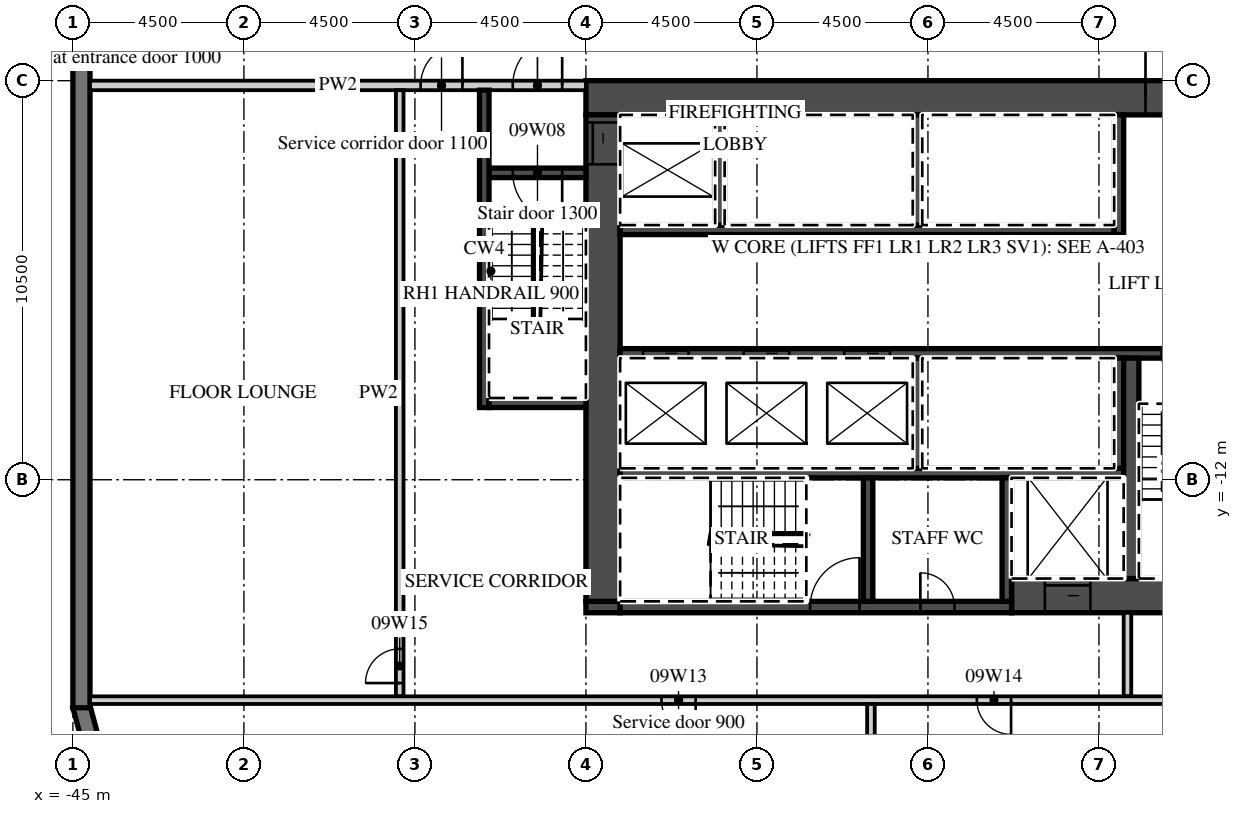
"""IFC4 building model, lengths in metres.
Left out: names, types, materials, properties, quantities, classifications, styles, units other than length and angle.
Written with IfcOpenShell. Run it as: python <this file> out.ifc"""

import sys

from ifc_helpers import new_model, si_unit, direction, frame, frame_2d, origin, place, context, subcontext, project, spatial, polyline, rectangle, outline, extrude, element, fill, save


model = new_model("IFC4")
c1 = context("Model", 3, precision=1e-05, world=origin(), true_north=direction((0.0, 1.0)))
c2 = subcontext(c1, "Body", "Model", "MODEL_VIEW")
j1 = project(units=[si_unit("LENGTHUNIT", "METRE"), si_unit("PLANEANGLEUNIT", "RADIAN")], contexts=[c1])
p1 = place(None, origin())
s1 = spatial("IfcSite", under=j1, at=p1, CompositionType="ELEMENT")
p2 = place(p1, origin())
s2 = spatial("IfcBuilding", under=s1, at=p2, CompositionType="ELEMENT")
p3 = place(p2, frame((0.0, 0.0, 60.0)))
s3 = spatial("IfcBuildingStorey", under=s2, at=p3, CompositionType="ELEMENT", Elevation=60.0)
p4 = place(p3, frame((-44.783, -17.942, 0.0), z_axis=(0.0, 0.0, 1.0), x_axis=(0.25881466832, -0.965926999034, 0.0)))
e1 = element("IfcWall", 1, at=p4, inside=s3, PredefinedType="SOLIDWALL", context=c2, shape_type="SweptSolid", body=[
    extrude(outline(polyline([(0.0, -0.225), (2.071, -0.225), (1.95, 0.225), (0.121, 0.225), (0.0, -0.225)])), origin(), (0.0, 0.0, 1.0), 3.02),
])
p5 = place(p3, frame((-44.775, 18.0, 0.0), z_axis=(0.0, 0.0, 1.0), x_axis=(0.0, -1.0, 0.0)))
e2 = element("IfcWall", 2, at=p5, inside=s3, PredefinedType="SOLIDWALL", context=c2, shape_type="SweptSolid", body=[
    extrude(rectangle(XDim=36.0, YDim=0.45, at=frame_2d((18.0, 0.0))), origin(), (0.0, 0.0, 1.0), 3.02),
])
p6 = place(p5, frame((3.9, 0.0, 0.45)))
e3 = element("IfcOpeningElement", 3, at=p6, cuts=e2, PredefinedType="OPENING", context=c2, shape_type="SweptSolid", body=[
    extrude(rectangle(XDim=3.3, YDim=2.25, at=frame_2d((1.65, 1.125))), frame((0.0, 0.235, 0.0), z_axis=(0.0, -1.0, 0.0), x_axis=(1.0, 0.0, 0.0)), (0.0, 0.0, 1.0), 0.47),
])
p7 = place(p5, frame((8.4, 0.0, 0.45)))
e4 = element("IfcOpeningElement", 4, at=p7, cuts=e2, PredefinedType="OPENING", context=c2, shape_type="SweptSolid", body=[
    extrude(rectangle(XDim=3.3, YDim=2.25, at=frame_2d((1.65, 1.125))), frame((0.0, 0.235, 0.0), z_axis=(0.0, -1.0, 0.0), x_axis=(1.0, 0.0, 0.0)), (0.0, 0.0, 1.0), 0.47),
])
p8 = place(p5, frame((12.9, 0.0, 0.45)))
e5 = element("IfcOpeningElement", 5, at=p8, cuts=e2, PredefinedType="OPENING", context=c2, shape_type="SweptSolid", body=[
    extrude(rectangle(XDim=3.3, YDim=2.25, at=frame_2d((1.65, 1.125))), frame((0.0, 0.235, 0.0), z_axis=(0.0, -1.0, 0.0), x_axis=(1.0, 0.0, 0.0)), (0.0, 0.0, 1.0), 0.47),
])
p9 = place(p3, frame((-31.5, -1.95, 0.0), z_axis=(0.0, 0.0, 1.0), x_axis=(1.0, 0.0, 0.0)))
e6 = element("IfcWall", 6, at=p9, inside=s3, PredefinedType="SHEAR", context=c2, shape_type="SweptSolid", body=[
    extrude(rectangle(XDim=18.0, YDim=0.9, at=frame_2d((9.0, 0.0))), origin(), (0.0, 0.0, 1.0), 3.02),
])
p10 = place(p9, frame((14.725, 0.0, 0.0)))
e7 = element("IfcOpeningElement", 7, at=p10, cuts=e6, PredefinedType="OPENING", context=c2, shape_type="SweptSolid", body=[
    extrude(rectangle(XDim=1.8, YDim=2.1, at=frame_2d((0.9, 1.05))), frame((0.0, 0.46, 0.0), z_axis=(0.0, -1.0, 0.0), x_axis=(1.0, 0.0, 0.0)), (0.0, 0.0, 1.0), 0.92),
])
p11 = place(p3, frame((-20.3, -15.05, 0.0), z_axis=(0.0, 0.0, 1.0), x_axis=(1.0, 0.0, 0.0)))
e8 = element("IfcWall", 8, at=p11, inside=s3, PredefinedType="SHEAR", context=c2, shape_type="SweptSolid", body=[
    extrude(rectangle(XDim=6.8, YDim=0.9, at=frame_2d((3.4, 0.0))), origin(), (0.0, 0.0, 1.0), 3.02),
])
p12 = place(p11, frame((0.875, 0.0, 0.0)))
e9 = element("IfcOpeningElement", 9, at=p12, cuts=e8, PredefinedType="OPENING", context=c2, shape_type="SweptSolid", body=[
    extrude(rectangle(XDim=1.2, YDim=2.1, at=frame_2d((0.6, 1.05))), frame((0.0, 0.46, 0.0), z_axis=(0.0, -1.0, 0.0), x_axis=(1.0, 0.0, 0.0)), (0.0, 0.0, 1.0), 0.92),
])
p13 = place(p3, frame((-31.5, -15.35, 0.0), z_axis=(0.0, 0.0, 1.0), x_axis=(1.0, 0.0, 0.0)))
e10 = element("IfcWall", 10, at=p13, inside=s3, PredefinedType="SHEAR", context=c2, shape_type="SweptSolid", body=[
    extrude(rectangle(XDim=0.9, YDim=0.3, at=frame_2d((0.45, 0.0))), origin(), (0.0, 0.0, 1.0), 3.02),
])
p14 = place(p3, frame((-30.6, -15.35, 0.0), z_axis=(0.0, 0.0, 1.0), x_axis=(1.0, 0.0, 0.0)))
e11 = element("IfcWall", 11, at=p14, inside=s3, PredefinedType="SHEAR", context=c2, shape_type="SweptSolid", body=[
    extrude(rectangle(XDim=10.3, YDim=0.3, at=frame_2d((5.15, 0.0))), origin(), (0.0, 0.0, 1.0), 3.02),
])
p15 = place(p14, frame((5.0, 0.0, 0.0)))
e12 = element("IfcOpeningElement", 12, at=p15, cuts=e11, PredefinedType="OPENING", context=c2, shape_type="SweptSolid", body=[
    extrude(rectangle(XDim=1.3, YDim=2.1, at=frame_2d((0.65, 1.05))), frame((0.0, 0.16, 0.0), z_axis=(0.0, -1.0, 0.0), x_axis=(1.0, 0.0, 0.0)), (0.0, 0.0, 1.0), 0.32),
])
p16 = place(p14, frame((7.9, 0.0, 0.0)))
e13 = element("IfcOpeningElement", 13, at=p16, cuts=e11, PredefinedType="OPENING", context=c2, shape_type="SweptSolid", body=[
    extrude(rectangle(XDim=0.9, YDim=2.1, at=frame_2d((0.45, 1.05))), frame((0.0, 0.16, 0.0), z_axis=(0.0, -1.0, 0.0), x_axis=(1.0, 0.0, 0.0)), (0.0, 0.0, 1.0), 0.32),
])
p17 = place(p3, frame((-31.05, -15.2, 0.0), z_axis=(0.0, 0.0, 1.0), x_axis=(0.0, 1.0, 0.0)))
e14 = element("IfcWall", 14, at=p17, inside=s3, PredefinedType="SHEAR", context=c2, shape_type="SweptSolid", body=[
    extrude(rectangle(XDim=12.8, YDim=0.9, at=frame_2d((6.4, 0.0))), origin(), (0.0, 0.0, 1.0), 3.02),
])
p18 = place(p17, frame((11.5, 0.0, 0.0)))
e15 = element("IfcOpeningElement", 15, at=p18, cuts=e14, PredefinedType="OPENING", context=c2, shape_type="SweptSolid", body=[
    extrude(rectangle(XDim=1.1, YDim=2.1, at=frame_2d((0.55, 1.05))), frame((0.0, 0.46, 0.0), z_axis=(0.0, -1.0, 0.0), x_axis=(1.0, 0.0, 0.0)), (0.0, 0.0, 1.0), 0.92),
])
p19 = place(p3, frame((-30.6, -5.425, 0.0), z_axis=(0.0, 0.0, 1.0), x_axis=(1.0, 0.0, 0.0)))
e16 = element("IfcWall", 16, at=p19, inside=s3, PredefinedType="SHEAR", context=c2, shape_type="SweptSolid", body=[
    extrude(rectangle(XDim=13.0, YDim=0.25, at=frame_2d((6.5, 0.0))), origin(), (0.0, 0.0, 1.0), 3.02),
])
p20 = place(p3, frame((-17.475, -5.55, 0.0), z_axis=(0.0, 0.0, 1.0), x_axis=(0.0, 1.0, 0.0)))
e17 = element("IfcWall", 17, at=p20, inside=s3, PredefinedType="SHEAR", context=c2, shape_type="SweptSolid", body=[
    extrude(rectangle(XDim=3.15, YDim=0.25, at=frame_2d((1.575, 0.0))), origin(), (0.0, 0.0, 1.0), 3.02),
])
for number, where, z_axis, x_axis in (
    (18, (-27.975, -5.3, 0.0), (0.0, 0.0, 1.0), (0.0, 1.0, 0.0)),
    (19, (-22.775, -5.3, 0.0), (0.0, 0.0, 1.0), (0.0, 1.0, 0.0)),
):
    element("IfcWall", number, at=place(p3, frame(where, z_axis=z_axis, x_axis=x_axis)), inside=s3, PredefinedType="SHEAR", context=c2, shape_type="SweptSolid", body=[
        extrude(rectangle(XDim=2.9, YDim=0.25, at=frame_2d((1.45, 0.0))), origin(), (0.0, 0.0, 1.0), 3.02),
    ])
p21 = place(p3, frame((-30.6, -8.675, 0.0), z_axis=(0.0, 0.0, 1.0), x_axis=(1.0, 0.0, 0.0)))
e20 = element("IfcWall", 20, at=p21, inside=s3, PredefinedType="SHEAR", context=c2, shape_type="SweptSolid", body=[
    extrude(rectangle(XDim=16.2, YDim=0.25, at=frame_2d((8.1, 0.0))), origin(), (0.0, 0.0, 1.0), 3.02),
])
p22 = place(p21, frame((0.6, 0.0, 0.0)))
e21 = element("IfcOpeningElement", 21, at=p22, cuts=e20, PredefinedType="OPENING", context=c2, shape_type="SweptSolid", body=[
    extrude(rectangle(XDim=1.2, YDim=2.1, at=frame_2d((0.6, 1.05))), frame((0.0, 0.135, 0.0), z_axis=(0.0, -1.0, 0.0), x_axis=(1.0, 0.0, 0.0)), (0.0, 0.0, 1.0), 0.27),
])
p23 = place(p21, frame((3.25, 0.0, 0.0)))
e22 = element("IfcOpeningElement", 22, at=p23, cuts=e20, PredefinedType="OPENING", context=c2, shape_type="SweptSolid", body=[
    extrude(rectangle(XDim=1.2, YDim=2.1, at=frame_2d((0.6, 1.05))), frame((0.0, 0.135, 0.0), z_axis=(0.0, -1.0, 0.0), x_axis=(1.0, 0.0, 0.0)), (0.0, 0.0, 1.0), 0.27),
])
p24 = place(p21, frame((5.9, 0.0, 0.0)))
e23 = element("IfcOpeningElement", 23, at=p24, cuts=e20, PredefinedType="OPENING", context=c2, shape_type="SweptSolid", body=[
    extrude(rectangle(XDim=1.2, YDim=2.1, at=frame_2d((0.6, 1.05))), frame((0.0, 0.135, 0.0), z_axis=(0.0, -1.0, 0.0), x_axis=(1.0, 0.0, 0.0)), (0.0, 0.0, 1.0), 0.27),
])
p25 = place(p21, frame((14.25, 0.0, 0.0)))
e24 = element("IfcOpeningElement", 24, at=p25, cuts=e20, PredefinedType="OPENING", context=c2, shape_type="SweptSolid", body=[
    extrude(rectangle(XDim=1.3, YDim=2.1, at=frame_2d((0.65, 1.05))), frame((0.0, 0.135, 0.0), z_axis=(0.0, -1.0, 0.0), x_axis=(1.0, 0.0, 0.0)), (0.0, 0.0, 1.0), 0.27),
])
p26 = place(p3, frame((-30.6, -11.825, 0.0), z_axis=(0.0, 0.0, 1.0), x_axis=(1.0, 0.0, 0.0)))
e25 = element("IfcWall", 25, at=p26, inside=s3, PredefinedType="SHEAR", context=c2, shape_type="SweptSolid", body=[
    extrude(rectangle(XDim=13.25, YDim=0.25, at=frame_2d((6.625, 0.0))), origin(), (0.0, 0.0, 1.0), 3.02),
])
for number, where, z_axis, x_axis in (
    (26, (-17.475, -11.7, 0.0), (0.0, 0.0, 1.0), (0.0, 1.0, 0.0)),
    (27, (-22.775, -11.7, 0.0), (0.0, 0.0, 1.0), (0.0, 1.0, 0.0)),
):
    element("IfcWall", number, at=place(p3, frame(where, z_axis=z_axis, x_axis=x_axis)), inside=s3, PredefinedType="SHEAR", context=c2, shape_type="SweptSolid", body=[
        extrude(rectangle(XDim=2.9, YDim=0.25, at=frame_2d((1.45, 0.0))), origin(), (0.0, 0.0, 1.0), 3.02),
    ])
p27 = place(p3, frame((-17.15, -14.6, 0.0), z_axis=(0.0, 0.0, 1.0), x_axis=(0.0, 1.0, 0.0)))
e28 = element("IfcWall", 28, at=p27, inside=s3, PredefinedType="SHEAR", context=c2, shape_type="SweptSolid", body=[
    extrude(rectangle(XDim=5.8, YDim=0.4, at=frame_2d((2.9, 0.0))), origin(), (0.0, 0.0, 1.0), 3.02),
])
for number, where, z_axis, x_axis in (
    (29, (-20.425, -15.2, 0.0), (0.0, 0.0, 1.0), (0.0, 1.0, 0.0)),
    (30, (-24.075, -15.2, 0.0), (0.0, 0.0, 1.0), (0.0, 1.0, 0.0)),
):
    element("IfcWall", number, at=place(p3, frame(where, z_axis=z_axis, x_axis=x_axis)), inside=s3, PredefinedType="SHEAR", context=c2, shape_type="SweptSolid", body=[
        extrude(rectangle(XDim=3.25, YDim=0.25, at=frame_2d((1.625, 0.0))), origin(), (0.0, 0.0, 1.0), 3.02),
    ])
p28 = place(p3, frame((-44.55, -1.625, 0.0), z_axis=(0.0, 0.0, 1.0), x_axis=(1.0, 0.0, 0.0)))
e31 = element("IfcWall", 31, at=p28, inside=s3, PredefinedType="PARTITIONING", context=c2, shape_type="SweptSolid", body=[
    extrude(rectangle(XDim=13.05, YDim=0.25, at=frame_2d((6.525, 0.0))), origin(), (0.0, 0.0, 1.0), 3.02),
])
p29 = place(p28, frame((11.125, 0.0, 0.0)))
e32 = element("IfcOpeningElement", 32, at=p29, cuts=e31, PredefinedType="OPENING", context=c2, shape_type="SweptSolid", body=[
    extrude(rectangle(XDim=1.3, YDim=2.1, at=frame_2d((0.65, 1.05))), frame((0.0, 0.135, 0.0), z_axis=(0.0, -1.0, 0.0), x_axis=(1.0, 0.0, 0.0)), (0.0, 0.0, 1.0), 0.27),
])
p30 = place(p28, frame((8.7, 0.0, 0.0)))
e33 = element("IfcOpeningElement", 33, at=p30, cuts=e31, PredefinedType="OPENING", context=c2, shape_type="SweptSolid", body=[
    extrude(rectangle(XDim=1.1, YDim=2.1, at=frame_2d((0.55, 1.05))), frame((0.0, 0.135, 0.0), z_axis=(0.0, -1.0, 0.0), x_axis=(1.0, 0.0, 0.0)), (0.0, 0.0, 1.0), 0.27),
])
p31 = place(p3, frame((-34.05, -3.925, 0.0), z_axis=(0.0, 0.0, 1.0), x_axis=(1.0, 0.0, 0.0)))
e34 = element("IfcWall", 34, at=p31, inside=s3, PredefinedType="SHEAR", context=c2, shape_type="SweptSolid", body=[
    extrude(rectangle(XDim=2.55, YDim=0.25, at=frame_2d((1.275, 0.0))), origin(), (0.0, 0.0, 1.0), 3.02),
])
p32 = place(p31, frame((0.625, 0.0, 0.0)))
e35 = element("IfcOpeningElement", 35, at=p32, cuts=e34, PredefinedType="OPENING", context=c2, shape_type="SweptSolid", body=[
    extrude(rectangle(XDim=1.3, YDim=2.1, at=frame_2d((0.65, 1.05))), frame((0.0, 0.135, 0.0), z_axis=(0.0, -1.0, 0.0), x_axis=(1.0, 0.0, 0.0)), (0.0, 0.0, 1.0), 0.27),
])
p33 = place(p3, frame((-34.175, -10.1, 0.0), z_axis=(0.0, 0.0, 1.0), x_axis=(0.0, 1.0, 0.0)))
e36 = element("IfcWall", 36, at=p33, inside=s3, PredefinedType="SHEAR", context=c2, shape_type="SweptSolid", body=[
    extrude(rectangle(XDim=8.35, YDim=0.25, at=frame_2d((4.175, 0.0))), origin(), (0.0, 0.0, 1.0), 3.02),
])
p34 = place(p3, frame((-34.05, -9.975, 0.0), z_axis=(0.0, 0.0, 1.0), x_axis=(1.0, 0.0, 0.0)))
e37 = element("IfcWall", 37, at=p34, inside=s3, PredefinedType="SHEAR", context=c2, shape_type="SweptSolid", body=[
    extrude(rectangle(XDim=2.55, YDim=0.25, at=frame_2d((1.275, 0.0))), origin(), (0.0, 0.0, 1.0), 3.02),
])
p35 = place(p3, frame((-17.25, -17.7, 0.0), z_axis=(0.0, 0.0, 1.0), x_axis=(0.0, 1.0, 0.0)))
e38 = element("IfcWall", 38, at=p35, inside=s3, PredefinedType="PARTITIONING", context=c2, shape_type="SweptSolid", body=[
    extrude(rectangle(XDim=2.2, YDim=0.2, at=frame_2d((1.1, 0.0))), origin(), (0.0, 0.0, 1.0), 3.02),
])
p36 = place(p3, frame((-36.4, -17.7, 0.0), z_axis=(0.0, 0.0, 1.0), x_axis=(0.0, 1.0, 0.0)))
e39 = element("IfcWall", 39, at=p36, inside=s3, PredefinedType="PARTITIONING", context=c2, shape_type="SweptSolid", body=[
    extrude(rectangle(XDim=15.95, YDim=0.2, at=frame_2d((7.975, 0.0))), origin(), (0.0, 0.0, 1.0), 3.02),
])
p37 = place(p36, frame((0.35, 0.0, 0.0)))
e40 = element("IfcOpeningElement", 40, at=p37, cuts=e39, PredefinedType="OPENING", context=c2, shape_type="SweptSolid", body=[
    extrude(rectangle(XDim=0.9, YDim=2.1, at=frame_2d((0.45, 1.05))), frame((0.0, 0.11, 0.0), z_axis=(0.0, -1.0, 0.0), x_axis=(1.0, 0.0, 0.0)), (0.0, 0.0, 1.0), 0.22),
])
p38 = place(p3, frame((-44.55, -17.8, 0.0), z_axis=(0.0, 0.0, 1.0), x_axis=(1.0, 0.0, 0.0)))
e41 = element("IfcWall", 41, at=p38, inside=s3, PredefinedType="PARTITIONING", context=c2, shape_type="SweptSolid", body=[
    extrude(rectangle(XDim=30.95, YDim=0.2, at=frame_2d((15.475, 0.0))), origin(), (0.0, 0.0, 1.0), 3.02),
])
p39 = place(p38, frame((15.038, 0.0, 0.0)))
e42 = element("IfcOpeningElement", 42, at=p39, cuts=e41, PredefinedType="OPENING", context=c2, shape_type="SweptSolid", body=[
    extrude(rectangle(XDim=0.9, YDim=2.1, at=frame_2d((0.45, 1.05))), frame((0.0, 0.11, 0.0), z_axis=(0.0, -1.0, 0.0), x_axis=(1.0, 0.0, 0.0)), (0.0, 0.0, 1.0), 0.22),
])
p40 = place(p38, frame((23.337, 0.0, 0.0)))
e43 = element("IfcOpeningElement", 43, at=p40, cuts=e41, PredefinedType="OPENING", context=c2, shape_type="SweptSolid", body=[
    extrude(rectangle(XDim=0.9, YDim=2.1, at=frame_2d((0.45, 1.05))), frame((0.0, 0.11, 0.0), z_axis=(0.0, -1.0, 0.0), x_axis=(1.0, 0.0, 0.0)), (0.0, 0.0, 1.0), 0.22),
])
p41 = place(p3, frame((-24.0, -21.55, 0.0), z_axis=(0.0, 0.0, 1.0), x_axis=(0.0, 1.0, 0.0)))
e44 = element("IfcWall", 44, at=p41, inside=s3, PredefinedType="PARTITIONING", context=c2, shape_type="SweptSolid", body=[
    extrude(rectangle(XDim=3.65, YDim=0.2, at=frame_2d((1.825, 0.0))), origin(), (0.0, 0.0, 1.0), 3.02),
])
p42 = place(p22, origin())
e45 = element("IfcDoor", 45, at=p42, inside=s3, OperationType="SLIDING_TO_LEFT", PredefinedType="DOOR", context=c2, shape_type="SweptSolid", body=[
    extrude(rectangle(XDim=1.2, YDim=2.1, at=frame_2d((0.6, 1.05))), frame((0.0, 0.025, 0.0), z_axis=(0.0, -1.0, 0.0), x_axis=(1.0, 0.0, 0.0)), (0.0, 0.0, 1.0), 0.05),
])
fill(e21, e45)
p43 = place(p23, origin())
e46 = element("IfcDoor", 46, at=p43, inside=s3, OperationType="SLIDING_TO_RIGHT", PredefinedType="DOOR", context=c2, shape_type="SweptSolid", body=[
    extrude(rectangle(XDim=1.2, YDim=2.1, at=frame_2d((0.6, 1.05))), frame((0.0, 0.025, 0.0), z_axis=(0.0, -1.0, 0.0), x_axis=(1.0, 0.0, 0.0)), (0.0, 0.0, 1.0), 0.05),
])
fill(e22, e46)
p44 = place(p24, origin())
e47 = element("IfcDoor", 47, at=p44, inside=s3, OperationType="SLIDING_TO_RIGHT", PredefinedType="DOOR", context=c2, shape_type="SweptSolid", body=[
    extrude(rectangle(XDim=1.2, YDim=2.1, at=frame_2d((0.6, 1.05))), frame((0.0, 0.025, 0.0), z_axis=(0.0, -1.0, 0.0), x_axis=(1.0, 0.0, 0.0)), (0.0, 0.0, 1.0), 0.05),
])
fill(e23, e47)
p45 = place(p12, origin())
e48 = element("IfcDoor", 48, at=p45, inside=s3, OperationType="SLIDING_TO_LEFT", PredefinedType="DOOR", context=c2, shape_type="SweptSolid", body=[
    extrude(rectangle(XDim=1.2, YDim=2.1, at=frame_2d((0.6, 1.05))), frame((0.0, 0.025, 0.0), z_axis=(0.0, -1.0, 0.0), x_axis=(1.0, 0.0, 0.0)), (0.0, 0.0, 1.0), 0.05),
])
fill(e9, e48)
p46 = place(p18, origin())
e49 = element("IfcDoor", 49, at=p46, inside=s3, OperationType="SLIDING_TO_RIGHT", PredefinedType="DOOR", context=c2, shape_type="SweptSolid", body=[
    extrude(rectangle(XDim=1.1, YDim=2.1, at=frame_2d((0.55, 1.05))), frame((0.0, 0.025, 0.0), z_axis=(0.0, -1.0, 0.0), x_axis=(1.0, 0.0, 0.0)), (0.0, 0.0, 1.0), 0.05),
])
fill(e15, e49)
p47 = place(p10, origin())
e50 = element("IfcDoor", 50, at=p47, inside=s3, OperationType="DOUBLE_DOOR_DOUBLE_SWING", PredefinedType="DOOR", context=c2, shape_type="SweptSolid", body=[
    extrude(rectangle(XDim=1.8, YDim=2.1, at=frame_2d((0.9, 1.05))), frame((0.0, 0.025, 0.0), z_axis=(0.0, -1.0, 0.0), x_axis=(1.0, 0.0, 0.0)), (0.0, 0.0, 1.0), 0.05),
])
fill(e7, e50)
p48 = place(p29, origin())
e51 = element("IfcDoor", 51, at=p48, inside=s3, OperationType="SINGLE_SWING_RIGHT", PredefinedType="DOOR", context=c2, shape_type="SweptSolid", body=[
    extrude(rectangle(XDim=1.3, YDim=2.1, at=frame_2d((0.65, 1.05))), frame((0.0, 0.025, 0.0), z_axis=(0.0, -1.0, 0.0), x_axis=(1.0, 0.0, 0.0)), (0.0, 0.0, 1.0), 0.05),
])
fill(e32, e51)
p49 = place(p32, origin())
e52 = element("IfcDoor", 52, at=p49, inside=s3, OperationType="SINGLE_SWING_RIGHT", PredefinedType="DOOR", context=c2, shape_type="SweptSolid", body=[
    extrude(rectangle(XDim=1.3, YDim=2.1, at=frame_2d((0.65, 1.05))), frame((0.0, 0.025, 0.0), z_axis=(0.0, -1.0, 0.0), x_axis=(1.0, 0.0, 0.0)), (0.0, 0.0, 1.0), 0.05),
])
fill(e35, e52)
p50 = place(p30, origin())
e53 = element("IfcDoor", 53, at=p50, inside=s3, OperationType="SINGLE_SWING_RIGHT", PredefinedType="DOOR", context=c2, shape_type="SweptSolid", body=[
    extrude(rectangle(XDim=1.1, YDim=2.1, at=frame_2d((0.55, 1.05))), frame((0.0, 0.025, 0.0), z_axis=(0.0, -1.0, 0.0), x_axis=(1.0, 0.0, 0.0)), (0.0, 0.0, 1.0), 0.05),
])
fill(e33, e53)
p51 = place(p25, origin())
e54 = element("IfcDoor", 54, at=p51, inside=s3, OperationType="SINGLE_SWING_RIGHT", PredefinedType="DOOR", context=c2, shape_type="SweptSolid", body=[
    extrude(rectangle(XDim=1.3, YDim=2.1, at=frame_2d((0.65, 1.05))), frame((0.0, 0.025, 0.0), z_axis=(0.0, -1.0, 0.0), x_axis=(1.0, 0.0, 0.0)), (0.0, 0.0, 1.0), 0.05),
])
fill(e24, e54)
p52 = place(p15, origin())
e55 = element("IfcDoor", 55, at=p52, inside=s3, OperationType="SINGLE_SWING_RIGHT", PredefinedType="DOOR", context=c2, shape_type="SweptSolid", body=[
    extrude(rectangle(XDim=1.3, YDim=2.1, at=frame_2d((0.65, 1.05))), frame((0.0, 0.025, 0.0), z_axis=(0.0, -1.0, 0.0), x_axis=(1.0, 0.0, 0.0)), (0.0, 0.0, 1.0), 0.05),
])
fill(e12, e55)
p53 = place(p16, origin())
e56 = element("IfcDoor", 56, at=p53, inside=s3, OperationType="SINGLE_SWING_LEFT", PredefinedType="DOOR", context=c2, shape_type="SweptSolid", body=[
    extrude(rectangle(XDim=0.9, YDim=2.1, at=frame_2d((0.45, 1.05))), frame((0.0, 0.025, 0.0), z_axis=(0.0, -1.0, 0.0), x_axis=(1.0, 0.0, 0.0)), (0.0, 0.0, 1.0), 0.05),
])
fill(e13, e56)
p54 = place(p39, origin())
e57 = element("IfcDoor", 57, at=p54, inside=s3, OperationType="SINGLE_SWING_RIGHT", PredefinedType="DOOR", context=c2, shape_type="SweptSolid", body=[
    extrude(rectangle(XDim=0.9, YDim=2.1, at=frame_2d((0.45, 1.05))), frame((0.0, 0.025, 0.0), z_axis=(0.0, -1.0, 0.0), x_axis=(1.0, 0.0, 0.0)), (0.0, 0.0, 1.0), 0.05),
])
fill(e42, e57)
p55 = place(p40, origin())
e58 = element("IfcDoor", 58, at=p55, inside=s3, OperationType="SINGLE_SWING_RIGHT", PredefinedType="DOOR", context=c2, shape_type="SweptSolid", body=[
    extrude(rectangle(XDim=0.9, YDim=2.1, at=frame_2d((0.45, 1.05))), frame((0.0, 0.025, 0.0), z_axis=(0.0, -1.0, 0.0), x_axis=(1.0, 0.0, 0.0)), (0.0, 0.0, 1.0), 0.05),
])
fill(e43, e58)
p56 = place(p37, origin())
e59 = element("IfcDoor", 59, at=p56, inside=s3, OperationType="SINGLE_SWING_LEFT", PredefinedType="DOOR", context=c2, shape_type="SweptSolid", body=[
    extrude(rectangle(XDim=0.9, YDim=2.1, at=frame_2d((0.45, 1.05))), frame((0.0, 0.025, 0.0), z_axis=(0.0, -1.0, 0.0), x_axis=(1.0, 0.0, 0.0)), (0.0, 0.0, 1.0), 0.05),
])
fill(e40, e59)
save(model, sys.argv[1])
